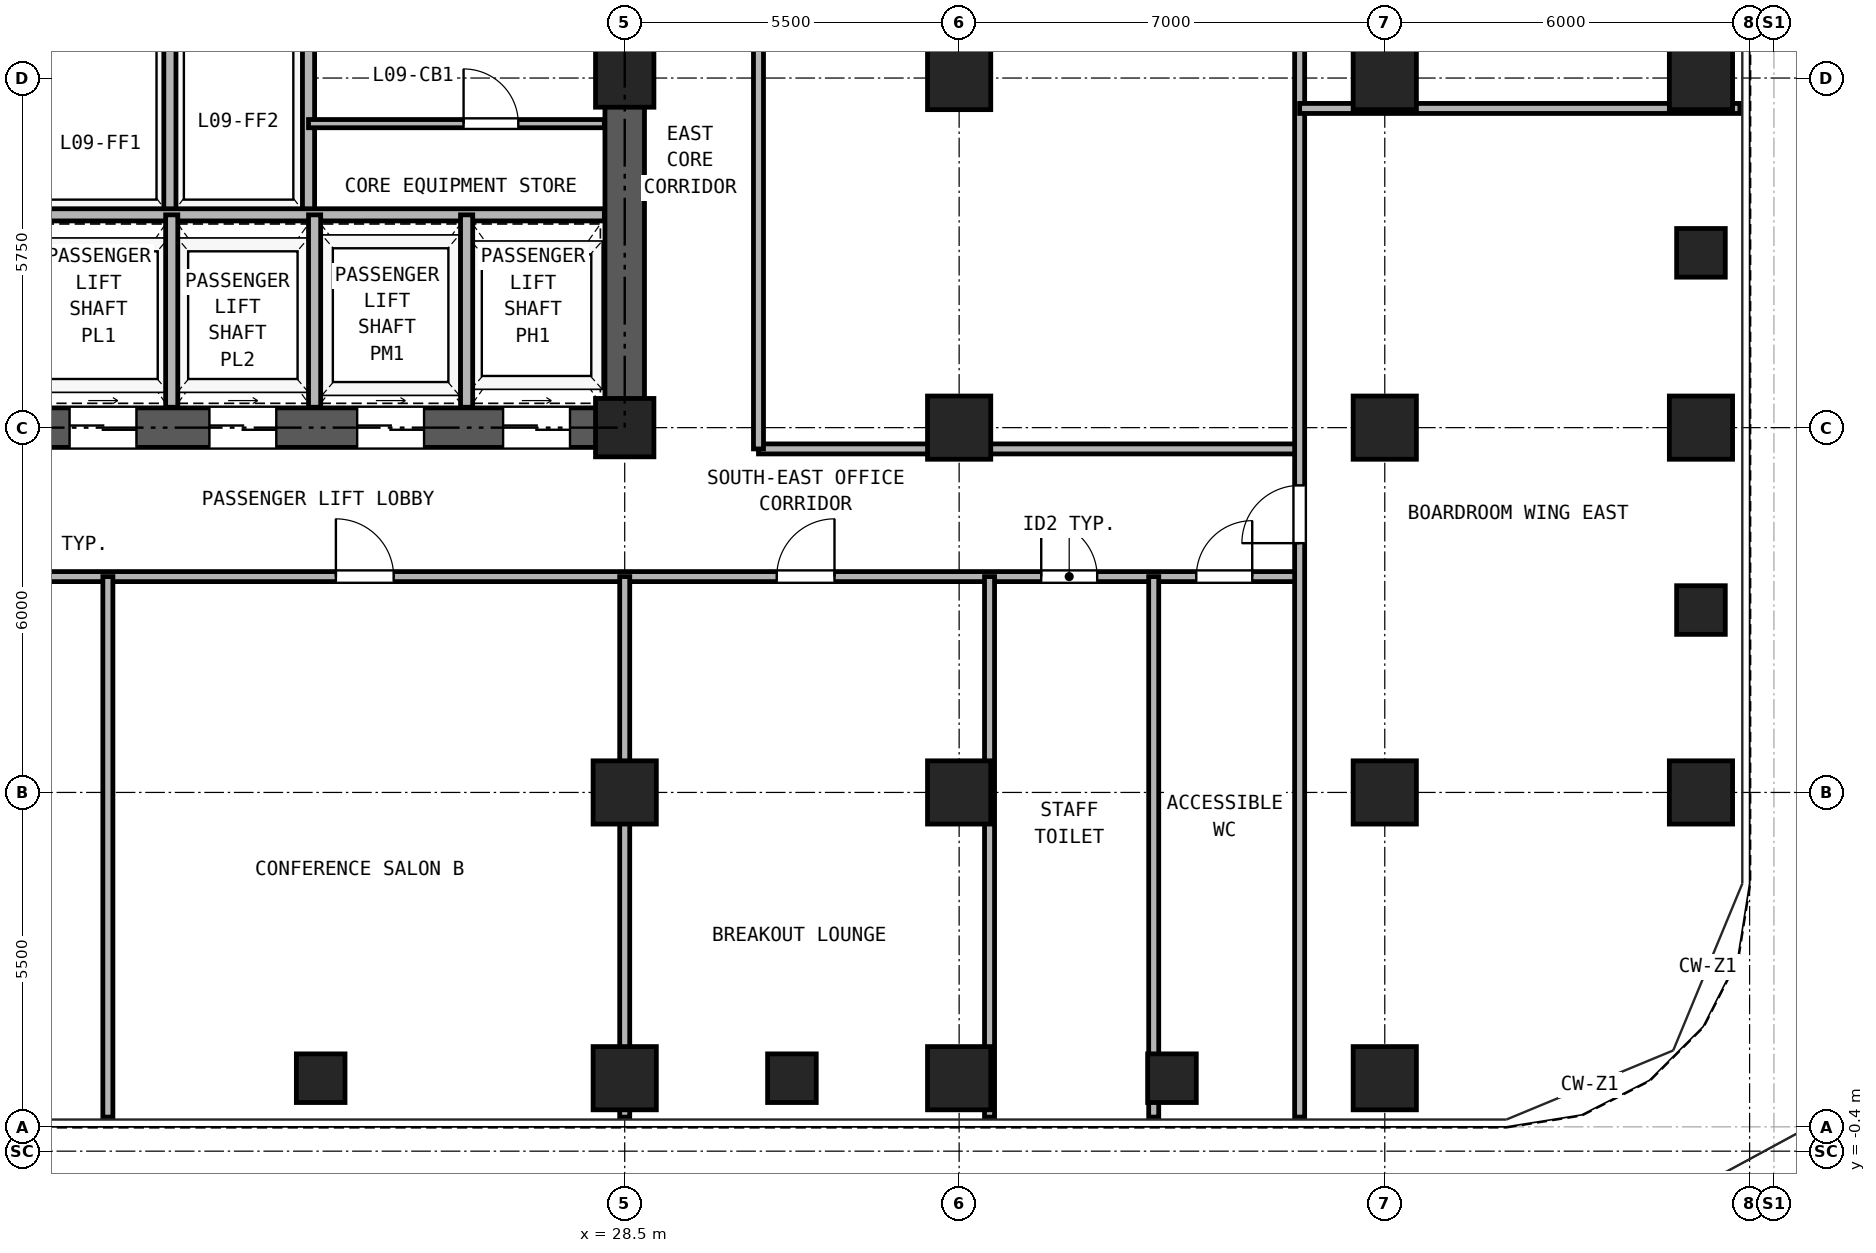
"""IFC4 building model, lengths in metres.
Left out: names, types, materials, properties, quantities, classifications, styles, units other than length and angle.
Written with IfcOpenShell. Run it as: python <this file> out.ifc"""

import sys

from ifc_helpers import new_model, si_unit, direction, frame, frame_2d, origin, origin_2d, place, context, subcontext, project, spatial, rectangle, hollow_rectangle, extrude, source, transform, mapped, element, fill, save


model = new_model("IFC4")
c1 = context("Model", 3, precision=1e-05, world=origin(), true_north=direction((0.0, 1.0)))
c2 = subcontext(c1, "Body", "Model", "MODEL_VIEW")
j1 = project(units=[si_unit("LENGTHUNIT", "METRE"), si_unit("PLANEANGLEUNIT", "RADIAN")], contexts=[c1])
p1 = place(None, origin())
s1 = spatial("IfcSite", under=j1, at=p1, CompositionType="ELEMENT")
p2 = place(p1, origin())
s2 = spatial("IfcBuilding", under=s1, at=p2, CompositionType="ELEMENT")
p3 = place(p2, frame((0.0, 0.0, 36.9)))
s3 = spatial("IfcBuildingStorey", under=s2, at=p3, CompositionType="ELEMENT", Elevation=36.9)
m1 = source(origin(), c2, "Body", "SweptSolid", [
    extrude(hollow_rectangle(XDim=1.04, YDim=1.04, WallThickness=0.065, at=origin_2d()), origin(), (0.0, 0.0, 1.0), 3.32),
])
for number, where, z_axis, x_axis in (
    (1, (28.5, 0.8, 0.0), (0.0, 0.0, 1.0), (1.0, 0.0, 0.0)),
    (2, (34.0, 0.8, 0.0), (0.0, 0.0, 1.0), (1.0, 0.0, 0.0)),
    (3, (41.0, 0.8, 0.0), (0.0, 0.0, 1.0), (1.0, 0.0, 0.0)),
    (4, (46.2, 5.5, 0.0), (0.0, 0.0, 1.0), (1.0, 0.0, 0.0)),
    (5, (46.2, 11.5, 0.0), (0.0, 0.0, 1.0), (1.0, 0.0, 0.0)),
    (6, (46.2, 17.25, 0.0), (0.0, 0.0, 1.0), (1.0, 0.0, 0.0)),
    (7, (28.5, 5.5, 0.0), (0.0, 0.0, 1.0), (1.0, 0.0, 0.0)),
):
    element("IfcColumn", number, at=place(p3, frame(where, z_axis=z_axis, x_axis=x_axis)), inside=s3, PredefinedType="COLUMN", context=c2, shape_type="MappedRepresentation", body=[
        mapped(m1, transform((0.0, 0.0, 0.0), x_axis=(1.0, 0.0, 0.0), y_axis=(0.0, 1.0, 0.0), z_axis=(0.0, 0.0, 1.0), scale=1.0)),
    ])
m2 = source(origin(), c2, "Body", "SweptSolid", [
    extrude(hollow_rectangle(XDim=0.96, YDim=0.96, WallThickness=0.06, at=origin_2d()), origin(), (0.0, 0.0, 1.0), 3.32),
])
for number, where, z_axis, x_axis in (
    (8, (28.5, 11.5, 0.0), (0.0, 0.0, 1.0), (1.0, 0.0, 0.0)),
    (9, (28.5, 17.25, 0.0), (0.0, 0.0, 1.0), (1.0, 0.0, 0.0)),
):
    element("IfcColumn", number, at=place(p3, frame(where, z_axis=z_axis, x_axis=x_axis)), inside=s3, PredefinedType="COLUMN", context=c2, shape_type="MappedRepresentation", body=[
        mapped(m2, transform((0.0, 0.0, 0.0), x_axis=(1.0, 0.0, 0.0), y_axis=(0.0, 1.0, 0.0), z_axis=(0.0, 0.0, 1.0), scale=1.0)),
    ])
for number, where, z_axis, x_axis in (
    (10, (34.0, 5.5, 0.0), (0.0, 0.0, 1.0), (1.0, 0.0, 0.0)),
    (11, (34.0, 11.5, 0.0), (0.0, 0.0, 1.0), (1.0, 0.0, 0.0)),
    (12, (34.0, 17.25, 0.0), (0.0, 0.0, 1.0), (1.0, 0.0, 0.0)),
    (13, (41.0, 5.5, 0.0), (0.0, 0.0, 1.0), (1.0, 0.0, 0.0)),
    (14, (41.0, 11.5, 0.0), (0.0, 0.0, 1.0), (1.0, 0.0, 0.0)),
    (15, (41.0, 17.25, 0.0), (0.0, 0.0, 1.0), (1.0, 0.0, 0.0)),
):
    element("IfcColumn", number, at=place(p3, frame(where, z_axis=z_axis, x_axis=x_axis)), inside=s3, PredefinedType="COLUMN", context=c2, shape_type="MappedRepresentation", body=[
        mapped(m1, transform((0.0, 0.0, 0.0), x_axis=(1.0, 0.0, 0.0), y_axis=(0.0, 1.0, 0.0), z_axis=(0.0, 0.0, 1.0), scale=1.0)),
    ])
m3 = source(origin(), c2, "Body", "SweptSolid", [
    extrude(hollow_rectangle(XDim=0.8, YDim=0.8, WallThickness=0.045, at=origin_2d()), origin(), (0.0, 0.0, 1.0), 3.32),
])
for number, where, z_axis, x_axis in (
    (16, (23.5, 0.8, 0.0), (0.0, 0.0, 1.0), (1.0, 0.0, 0.0)),
    (17, (31.25, 0.8, 0.0), (0.0, 0.0, 1.0), (1.0, 0.0, 0.0)),
    (18, (37.5, 0.8, 0.0), (0.0, 0.0, 1.0), (1.0, 0.0, 0.0)),
    (19, (46.2, 8.5, 0.0), (0.0, 0.0, 1.0), (1.0, 0.0, 0.0)),
    (20, (46.2, 14.375, 0.0), (0.0, 0.0, 1.0), (1.0, 0.0, 0.0)),
):
    element("IfcColumn", number, at=place(p3, frame(where, z_axis=z_axis, x_axis=x_axis)), inside=s3, PredefinedType="COLUMN", context=c2, shape_type="MappedRepresentation", body=[
        mapped(m3, transform((0.0, 0.0, 0.0), x_axis=(1.0, 0.0, 0.0), y_axis=(0.0, 1.0, 0.0), z_axis=(0.0, 0.0, 1.0), scale=1.0)),
    ])
p4 = place(p3, frame((18.175, 11.5, 0.0), z_axis=(0.0, 0.0, 1.0), x_axis=(1.0, 0.0, 0.0)))
e21 = element("IfcWall", 21, at=p4, inside=s3, PredefinedType="SHEAR", context=c2, shape_type="SweptSolid", body=[
    extrude(rectangle(XDim=10.65, YDim=0.65, at=frame_2d((5.325, 0.0))), origin(), (0.0, 0.0, 1.0), 3.32),
])
p5 = place(p4, frame((1.195, 0.0, 0.0)))
e22 = element("IfcOpeningElement", 22, at=p5, cuts=e21, PredefinedType="OPENING", context=c2, shape_type="SweptSolid", body=[
    extrude(rectangle(XDim=1.1, YDim=2.25, at=frame_2d((0.55, 1.125))), frame((0.0, 0.335, 0.0), z_axis=(0.0, -1.0, 0.0), x_axis=(1.0, 0.0, 0.0)), (0.0, 0.0, 1.0), 0.67),
])
p6 = place(p4, frame((3.495, 0.0, 0.0)))
e23 = element("IfcOpeningElement", 23, at=p6, cuts=e21, PredefinedType="OPENING", context=c2, shape_type="SweptSolid", body=[
    extrude(rectangle(XDim=1.1, YDim=2.25, at=frame_2d((0.55, 1.125))), frame((0.0, 0.335, 0.0), z_axis=(0.0, -1.0, 0.0), x_axis=(1.0, 0.0, 0.0)), (0.0, 0.0, 1.0), 0.67),
])
p7 = place(p4, frame((5.925, 0.0, 0.0)))
e24 = element("IfcOpeningElement", 24, at=p7, cuts=e21, PredefinedType="OPENING", context=c2, shape_type="SweptSolid", body=[
    extrude(rectangle(XDim=1.1, YDim=2.25, at=frame_2d((0.55, 1.125))), frame((0.0, 0.335, 0.0), z_axis=(0.0, -1.0, 0.0), x_axis=(1.0, 0.0, 0.0)), (0.0, 0.0, 1.0), 0.67),
])
p8 = place(p4, frame((8.325, 0.0, 0.0)))
e25 = element("IfcOpeningElement", 25, at=p8, cuts=e21, PredefinedType="OPENING", context=c2, shape_type="SweptSolid", body=[
    extrude(rectangle(XDim=1.1, YDim=2.25, at=frame_2d((0.55, 1.125))), frame((0.0, 0.335, 0.0), z_axis=(0.0, -1.0, 0.0), x_axis=(1.0, 0.0, 0.0)), (0.0, 0.0, 1.0), 0.67),
])
p9 = place(p3, frame((28.5, 11.825, 0.0), z_axis=(0.0, 0.0, 1.0), x_axis=(0.0, 1.0, 0.0)))
e26 = element("IfcWall", 26, at=p9, inside=s3, PredefinedType="SHEAR", context=c2, shape_type="SweptSolid", body=[
    extrude(rectangle(XDim=16.6, YDim=0.65, at=frame_2d((8.3, 0.0))), origin(), (0.0, 0.0, 1.0), 3.32),
])
p10 = place(p9, frame((7.325, 0.0, 0.0)))
e27 = element("IfcOpeningElement", 27, at=p10, cuts=e26, PredefinedType="OPENING", context=c2, shape_type="SweptSolid", body=[
    extrude(rectangle(XDim=1.15, YDim=2.2, at=frame_2d((0.575, 1.1))), frame((0.0, 0.335, 0.0), z_axis=(0.0, -1.0, 0.0), x_axis=(1.0, 0.0, 0.0)), (0.0, 0.0, 1.0), 0.67),
])
for number, where, z_axis, x_axis in (
    (28, (21.02, 15.0, 0.0), (0.0, 0.0, 1.0), (0.0, 1.0, 0.0)),
    (29, (23.3, 15.0, 0.0), (0.0, 0.0, 1.0), (0.0, 1.0, 0.0)),
):
    element("IfcWall", number, at=place(p3, frame(where, z_axis=z_axis, x_axis=x_axis)), inside=s3, PredefinedType="PARTITIONING", context=c2, shape_type="SweptSolid", body=[
        extrude(rectangle(XDim=3.0, YDim=0.2, at=frame_2d((1.5, 0.0))), origin(), (0.0, 0.0, 1.0), 3.32),
    ])
p11 = place(p3, frame((18.835, 15.0, 0.0), z_axis=(0.0, 0.0, 1.0), x_axis=(1.0, 0.0, 0.0)))
e30 = element("IfcWall", 30, at=p11, inside=s3, PredefinedType="PARTITIONING", context=c2, shape_type="SweptSolid", body=[
    extrude(rectangle(XDim=9.33, YDim=0.2, at=frame_2d((4.665, 0.0))), origin(), (0.0, 0.0, 1.0), 3.32),
])
p12 = place(p3, frame((23.3, 16.5, 0.0), z_axis=(0.0, 0.0, 1.0), x_axis=(1.0, 0.0, 0.0)))
e31 = element("IfcWall", 31, at=p12, inside=s3, PredefinedType="PARTITIONING", context=c2, shape_type="SweptSolid", body=[
    extrude(rectangle(XDim=4.865, YDim=0.135, at=frame_2d((2.433, 0.0))), origin(), (0.0, 0.0, 1.0), 3.32),
])
p13 = place(p12, frame((2.55, 0.0, 0.0)))
e32 = element("IfcOpeningElement", 32, at=p13, cuts=e31, PredefinedType="OPENING", context=c2, shape_type="SweptSolid", body=[
    extrude(rectangle(XDim=0.9, YDim=2.05, at=frame_2d((0.45, 1.025))), frame((0.0, 0.077, 0.0), z_axis=(0.0, -1.0, 0.0), x_axis=(1.0, 0.0, 0.0)), (0.0, 0.0, 1.0), 0.155),
])
for number, where, z_axis, x_axis in (
    (33, (21.05, 11.835, 0.0), (0.0, 0.0, 1.0), (0.0, 1.0, 0.0)),
    (34, (23.4, 11.835, 0.0), (0.0, 0.0, 1.0), (0.0, 1.0, 0.0)),
    (35, (25.9, 11.835, 0.0), (0.0, 0.0, 1.0), (0.0, 1.0, 0.0)),
):
    element("IfcWall", number, at=place(p3, frame(where, z_axis=z_axis, x_axis=x_axis)), inside=s3, PredefinedType="PARTITIONING", context=c2, shape_type="SweptSolid", body=[
        extrude(rectangle(XDim=3.165, YDim=0.2, at=frame_2d((1.583, 0.0))), origin(), (0.0, 0.0, 1.0), 3.32),
    ])
p14 = place(p3, frame((7.4, 9.05, 0.0), z_axis=(0.0, 0.0, 1.0), x_axis=(1.0, 0.0, 0.0)))
e36 = element("IfcWall", 36, at=p14, inside=s3, PredefinedType="PARTITIONING", context=c2, shape_type="SweptSolid", body=[
    extrude(rectangle(XDim=32.2, YDim=0.165, at=frame_2d((16.1, 0.0))), origin(), (0.0, 0.0, 1.0), 3.32),
])
p15 = place(p14, frame((5.8, 0.0, 0.0)))
e37 = element("IfcOpeningElement", 37, at=p15, cuts=e36, PredefinedType="OPENING", context=c2, shape_type="SweptSolid", body=[
    extrude(rectangle(XDim=0.95, YDim=2.15, at=frame_2d((0.475, 1.075))), frame((0.0, 0.093, 0.0), z_axis=(0.0, -1.0, 0.0), x_axis=(1.0, 0.0, 0.0)), (0.0, 0.0, 1.0), 0.185),
])
p16 = place(p14, frame((16.35, 0.0, 0.0)))
e38 = element("IfcOpeningElement", 38, at=p16, cuts=e36, PredefinedType="OPENING", context=c2, shape_type="SweptSolid", body=[
    extrude(rectangle(XDim=0.95, YDim=2.15, at=frame_2d((0.475, 1.075))), frame((0.0, 0.093, 0.0), z_axis=(0.0, -1.0, 0.0), x_axis=(1.0, 0.0, 0.0)), (0.0, 0.0, 1.0), 0.185),
])
p17 = place(p14, frame((23.6, 0.0, 0.0)))
e39 = element("IfcOpeningElement", 39, at=p17, cuts=e36, PredefinedType="OPENING", context=c2, shape_type="SweptSolid", body=[
    extrude(rectangle(XDim=0.95, YDim=2.15, at=frame_2d((0.475, 1.075))), frame((0.0, 0.093, 0.0), z_axis=(0.0, -1.0, 0.0), x_axis=(1.0, 0.0, 0.0)), (0.0, 0.0, 1.0), 0.185),
])
p18 = place(p14, frame((27.95, 0.0, 0.0)))
e40 = element("IfcOpeningElement", 40, at=p18, cuts=e36, PredefinedType="OPENING", context=c2, shape_type="SweptSolid", body=[
    extrude(rectangle(XDim=0.92, YDim=2.1, at=frame_2d((0.46, 1.05))), frame((0.0, 0.093, 0.0), z_axis=(0.0, -1.0, 0.0), x_axis=(1.0, 0.0, 0.0)), (0.0, 0.0, 1.0), 0.185),
])
p19 = place(p14, frame((30.5, 0.0, 0.0)))
e41 = element("IfcOpeningElement", 41, at=p19, cuts=e36, PredefinedType="OPENING", context=c2, shape_type="SweptSolid", body=[
    extrude(rectangle(XDim=0.92, YDim=2.1, at=frame_2d((0.46, 1.05))), frame((0.0, 0.093, 0.0), z_axis=(0.0, -1.0, 0.0), x_axis=(1.0, 0.0, 0.0)), (0.0, 0.0, 1.0), 0.185),
])
p20 = place(p3, frame((30.7, 11.15, 0.0), z_axis=(0.0, 0.0, 1.0), x_axis=(1.0, 0.0, 0.0)))
e42 = element("IfcWall", 42, at=p20, inside=s3, PredefinedType="PARTITIONING", context=c2, shape_type="SweptSolid", body=[
    extrude(rectangle(XDim=8.9, YDim=0.165, at=frame_2d((4.45, 0.0))), origin(), (0.0, 0.0, 1.0), 3.32),
])
p21 = place(p3, frame((30.7, 11.15, 0.0), z_axis=(0.0, 0.0, 1.0), x_axis=(0.0, 1.0, 0.0)))
e43 = element("IfcWall", 43, at=p21, inside=s3, PredefinedType="PARTITIONING", context=c2, shape_type="SweptSolid", body=[
    extrude(rectangle(XDim=18.25, YDim=0.165, at=frame_2d((9.125, 0.0))), origin(), (0.0, 0.0, 1.0), 3.32),
])
p22 = place(p21, frame((8.625, 0.0, 0.0)))
e44 = element("IfcOpeningElement", 44, at=p22, cuts=e43, PredefinedType="OPENING", context=c2, shape_type="SweptSolid", body=[
    extrude(rectangle(XDim=0.95, YDim=2.15, at=frame_2d((0.475, 1.075))), frame((0.0, 0.093, 0.0), z_axis=(0.0, -1.0, 0.0), x_axis=(1.0, 0.0, 0.0)), (0.0, 0.0, 1.0), 0.185),
])
p23 = place(p3, frame((39.6, 0.16, 0.0), z_axis=(0.0, 0.0, 1.0), x_axis=(0.0, 1.0, 0.0)))
e45 = element("IfcWall", 45, at=p23, inside=s3, PredefinedType="PARTITIONING", context=c2, shape_type="SweptSolid", body=[
    extrude(rectangle(XDim=40.18, YDim=0.165, at=frame_2d((20.09, 0.0))), origin(), (0.0, 0.0, 1.0), 3.32),
])
p24 = place(p23, frame((9.44, 0.0, 0.0)))
e46 = element("IfcOpeningElement", 46, at=p24, cuts=e45, PredefinedType="OPENING", context=c2, shape_type="SweptSolid", body=[
    extrude(rectangle(XDim=0.95, YDim=2.15, at=frame_2d((0.475, 1.075))), frame((0.0, 0.093, 0.0), z_axis=(0.0, -1.0, 0.0), x_axis=(1.0, 0.0, 0.0)), (0.0, 0.0, 1.0), 0.185),
])
p25 = place(p23, frame((29.79, 0.0, 0.0)))
e47 = element("IfcOpeningElement", 47, at=p25, cuts=e45, PredefinedType="OPENING", context=c2, shape_type="SweptSolid", body=[
    extrude(rectangle(XDim=0.95, YDim=2.15, at=frame_2d((0.475, 1.075))), frame((0.0, 0.093, 0.0), z_axis=(0.0, -1.0, 0.0), x_axis=(1.0, 0.0, 0.0)), (0.0, 0.0, 1.0), 0.185),
])
p26 = place(p3, frame((20.0, 0.16, 0.0), z_axis=(0.0, 0.0, 1.0), x_axis=(0.0, 1.0, 0.0)))
e48 = element("IfcWall", 48, at=p26, inside=s3, PredefinedType="PARTITIONING", context=c2, shape_type="SweptSolid", body=[
    extrude(rectangle(XDim=8.89, YDim=0.165, at=frame_2d((4.445, 0.0))), origin(), (0.0, 0.0, 1.0), 3.32),
])
p27 = place(p3, frame((28.5, 0.16, 0.0), z_axis=(0.0, 0.0, 1.0), x_axis=(0.0, 1.0, 0.0)))
e49 = element("IfcWall", 49, at=p27, inside=s3, PredefinedType="PARTITIONING", context=c2, shape_type="SweptSolid", body=[
    extrude(rectangle(XDim=8.89, YDim=0.165, at=frame_2d((4.445, 0.0))), origin(), (0.0, 0.0, 1.0), 2.539),
])
for number, where, z_axis, x_axis in (
    (50, (34.5, 0.16, 0.0), (0.0, 0.0, 1.0), (0.0, 1.0, 0.0)),
    (51, (37.2, 0.16, 0.0), (0.0, 0.0, 1.0), (0.0, 1.0, 0.0)),
):
    element("IfcWall", number, at=place(p3, frame(where, z_axis=z_axis, x_axis=x_axis)), inside=s3, PredefinedType="PARTITIONING", context=c2, shape_type="SweptSolid", body=[
        extrude(rectangle(XDim=8.89, YDim=0.165, at=frame_2d((4.445, 0.0))), origin(), (0.0, 0.0, 1.0), 3.32),
    ])
p28 = place(p3, frame((39.6, 16.75, 0.0), z_axis=(0.0, 0.0, 1.0), x_axis=(1.0, 0.0, 0.0)))
e52 = element("IfcWall", 52, at=p28, inside=s3, PredefinedType="PARTITIONING", context=c2, shape_type="SweptSolid", body=[
    extrude(rectangle(XDim=7.24, YDim=0.165, at=frame_2d((3.62, 0.0))), origin(), (0.0, 0.0, 1.0), 3.32),
])
p29 = place(p13, frame((0.9, 0.0, 0.0), z_axis=(0.0, 0.0, 1.0), x_axis=(-1.0, 0.0, 0.0)))
e53 = element("IfcDoor", 53, at=p29, inside=s3, OperationType="SINGLE_SWING_LEFT", PredefinedType="DOOR", context=c2, shape_type="SweptSolid", body=[
    extrude(rectangle(XDim=0.9, YDim=2.05, at=frame_2d((0.45, 1.025))), frame((0.0, 0.025, 0.0), z_axis=(0.0, -1.0, 0.0), x_axis=(1.0, 0.0, 0.0)), (0.0, 0.0, 1.0), 0.05),
])
fill(e32, e53)
p30 = place(p5, frame((1.1, 0.0, 0.0), z_axis=(0.0, 0.0, 1.0), x_axis=(-1.0, 0.0, 0.0)))
e54 = element("IfcDoor", 54, at=p30, inside=s3, OperationType="DOUBLE_DOOR_SLIDING", PredefinedType="DOOR", context=c2, shape_type="SweptSolid", body=[
    extrude(rectangle(XDim=1.1, YDim=2.25, at=frame_2d((0.55, 1.125))), frame((0.0, 0.025, 0.0), z_axis=(0.0, -1.0, 0.0), x_axis=(1.0, 0.0, 0.0)), (0.0, 0.0, 1.0), 0.05),
])
fill(e22, e54)
p31 = place(p6, frame((1.1, 0.0, 0.0), z_axis=(0.0, 0.0, 1.0), x_axis=(-1.0, 0.0, 0.0)))
e55 = element("IfcDoor", 55, at=p31, inside=s3, OperationType="DOUBLE_DOOR_SLIDING", PredefinedType="DOOR", context=c2, shape_type="SweptSolid", body=[
    extrude(rectangle(XDim=1.1, YDim=2.25, at=frame_2d((0.55, 1.125))), frame((0.0, 0.025, 0.0), z_axis=(0.0, -1.0, 0.0), x_axis=(1.0, 0.0, 0.0)), (0.0, 0.0, 1.0), 0.05),
])
fill(e23, e55)
p32 = place(p7, frame((1.1, 0.0, 0.0), z_axis=(0.0, 0.0, 1.0), x_axis=(-1.0, 0.0, 0.0)))
e56 = element("IfcDoor", 56, at=p32, inside=s3, OperationType="DOUBLE_DOOR_SLIDING", PredefinedType="DOOR", context=c2, shape_type="SweptSolid", body=[
    extrude(rectangle(XDim=1.1, YDim=2.25, at=frame_2d((0.55, 1.125))), frame((0.0, 0.025, 0.0), z_axis=(0.0, -1.0, 0.0), x_axis=(1.0, 0.0, 0.0)), (0.0, 0.0, 1.0), 0.05),
])
fill(e24, e56)
p33 = place(p8, frame((1.1, 0.0, 0.0), z_axis=(0.0, 0.0, 1.0), x_axis=(-1.0, 0.0, 0.0)))
e57 = element("IfcDoor", 57, at=p33, inside=s3, OperationType="DOUBLE_DOOR_SLIDING", PredefinedType="DOOR", context=c2, shape_type="SweptSolid", body=[
    extrude(rectangle(XDim=1.1, YDim=2.25, at=frame_2d((0.55, 1.125))), frame((0.0, 0.025, 0.0), z_axis=(0.0, -1.0, 0.0), x_axis=(1.0, 0.0, 0.0)), (0.0, 0.0, 1.0), 0.05),
])
fill(e25, e57)
p34 = place(p16, frame((0.95, 0.0, 0.0), z_axis=(0.0, 0.0, 1.0), x_axis=(-1.0, 0.0, 0.0)))
e58 = element("IfcDoor", 58, at=p34, inside=s3, OperationType="SINGLE_SWING_LEFT", PredefinedType="DOOR", context=c2, shape_type="SweptSolid", body=[
    extrude(rectangle(XDim=0.95, YDim=2.15, at=frame_2d((0.475, 1.075))), frame((0.0, 0.025, 0.0), z_axis=(0.0, -1.0, 0.0), x_axis=(1.0, 0.0, 0.0)), (0.0, 0.0, 1.0), 0.05),
])
fill(e38, e58)
p35 = place(p17, frame((0.95, 0.0, 0.0), z_axis=(0.0, 0.0, 1.0), x_axis=(-1.0, 0.0, 0.0)))
e59 = element("IfcDoor", 59, at=p35, inside=s3, OperationType="SINGLE_SWING_RIGHT", PredefinedType="DOOR", context=c2, shape_type="SweptSolid", body=[
    extrude(rectangle(XDim=0.95, YDim=2.15, at=frame_2d((0.475, 1.075))), frame((0.0, 0.025, 0.0), z_axis=(0.0, -1.0, 0.0), x_axis=(1.0, 0.0, 0.0)), (0.0, 0.0, 1.0), 0.05),
])
fill(e39, e59)
p36 = place(p18, frame((0.92, 0.0, 0.0), z_axis=(0.0, 0.0, 1.0), x_axis=(-1.0, 0.0, 0.0)))
e60 = element("IfcDoor", 60, at=p36, inside=s3, OperationType="SINGLE_SWING_LEFT", PredefinedType="DOOR", context=c2, shape_type="SweptSolid", body=[
    extrude(rectangle(XDim=0.92, YDim=2.1, at=frame_2d((0.46, 1.05))), frame((0.0, 0.025, 0.0), z_axis=(0.0, -1.0, 0.0), x_axis=(1.0, 0.0, 0.0)), (0.0, 0.0, 1.0), 0.05),
])
fill(e40, e60)
p37 = place(p19, frame((0.92, 0.0, 0.0), z_axis=(0.0, 0.0, 1.0), x_axis=(-1.0, 0.0, 0.0)))
e61 = element("IfcDoor", 61, at=p37, inside=s3, OperationType="SINGLE_SWING_RIGHT", PredefinedType="DOOR", context=c2, shape_type="SweptSolid", body=[
    extrude(rectangle(XDim=0.92, YDim=2.1, at=frame_2d((0.46, 1.05))), frame((0.0, 0.025, 0.0), z_axis=(0.0, -1.0, 0.0), x_axis=(1.0, 0.0, 0.0)), (0.0, 0.0, 1.0), 0.05),
])
fill(e41, e61)
p38 = place(p24, origin())
e62 = element("IfcDoor", 62, at=p38, inside=s3, OperationType="SINGLE_SWING_LEFT", PredefinedType="DOOR", context=c2, shape_type="SweptSolid", body=[
    extrude(rectangle(XDim=0.95, YDim=2.15, at=frame_2d((0.475, 1.075))), frame((0.0, 0.025, 0.0), z_axis=(0.0, -1.0, 0.0), x_axis=(1.0, 0.0, 0.0)), (0.0, 0.0, 1.0), 0.05),
])
fill(e46, e62)
save(model, sys.argv[1])
